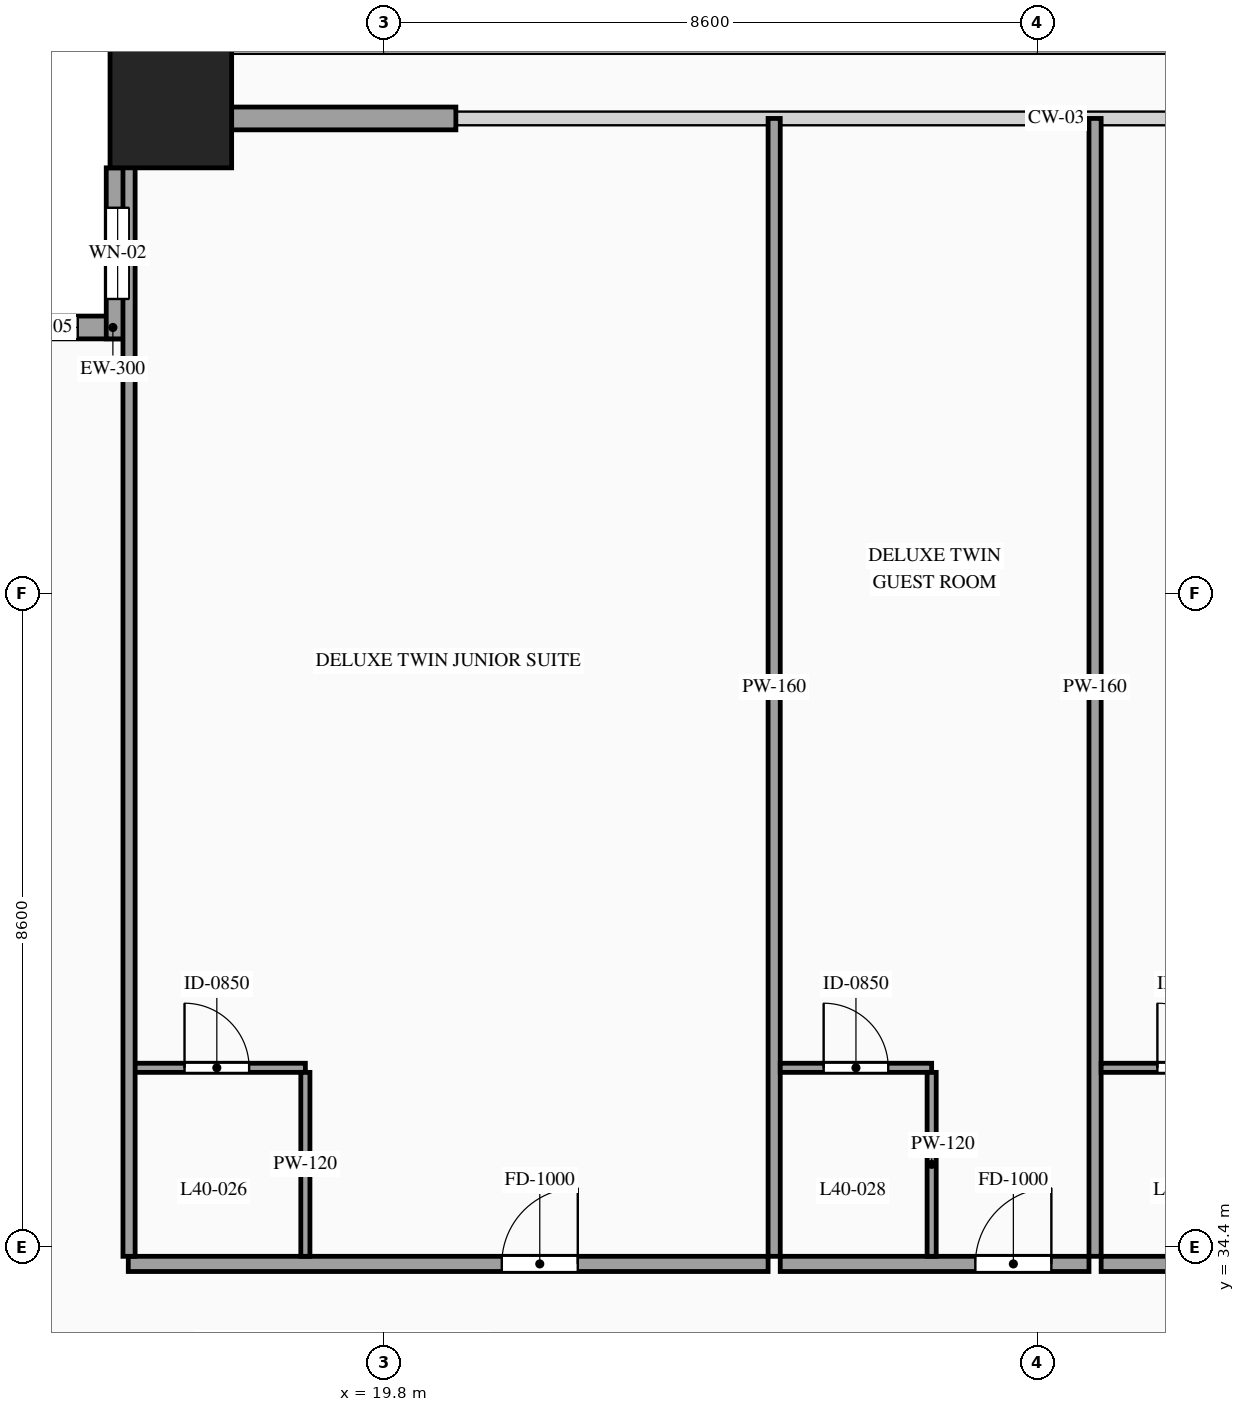
"""IFC4 building model, lengths in metres.
Left out: names, types, materials, properties, quantities, classifications, styles, units other than length and angle.
Written with IfcOpenShell. Run it as: python <this file> out.ifc"""

import sys

from ifc_helpers import new_model, si_unit, direction, frame, frame_2d, origin, origin_2d, place, context, subcontext, project, spatial, rectangle, hollow_rectangle, extrude, source, transform, mapped, element, fill, save


model = new_model("IFC4")
c1 = context("Model", 3, precision=1e-05, world=origin(), true_north=direction((0.0, 1.0)))
c2 = subcontext(c1, "Body", "Model", "MODEL_VIEW")
j1 = project(units=[si_unit("LENGTHUNIT", "METRE"), si_unit("PLANEANGLEUNIT", "RADIAN")], contexts=[c1])
p1 = place(None, origin())
s1 = spatial("IfcSite", under=j1, at=p1, CompositionType="ELEMENT")
p2 = place(p1, origin())
s2 = spatial("IfcBuilding", under=s1, at=p2, CompositionType="ELEMENT")
p3 = place(p2, frame((0.0, 0.0, 152.4)))
s3 = spatial("IfcBuildingStorey", under=s2, at=p3, CompositionType="ELEMENT", Elevation=152.4)
m1 = source(origin(), c2, "Body", "SweptSolid", [
    extrude(hollow_rectangle(XDim=1.6, YDim=1.6, WallThickness=0.07, at=origin_2d()), origin(), (0.0, 0.0, 1.0), 3.6),
])
p4 = place(p3, frame((17.0, 49.4, 0.0), z_axis=(0.0, 0.0, 1.0), x_axis=(1.0, 0.0, 0.0)))
e1 = element("IfcColumn", 1, at=p4, inside=s3, PredefinedType="COLUMN", context=c2, shape_type="MappedRepresentation", body=[
    mapped(m1, transform((0.0, 0.0, 0.0), scale=1.0)),
])
p5 = place(p3, frame((16.45, 46.5, 0.0), z_axis=(0.0, 0.0, 1.0), x_axis=(-1.0, 0.0, 0.0)))
e2 = element("IfcWall", 2, at=p5, inside=s3, PredefinedType="SOLIDWALL", context=c2, shape_type="SweptSolid", body=[
    extrude(rectangle(XDim=2.25, YDim=0.3, at=frame_2d((1.125, 0.0))), origin(), (0.0, 0.0, 1.0), 3.38),
])
p6 = place(p5, frame((0.675, 0.0, 0.85)))
e3 = element("IfcOpeningElement", 3, at=p6, cuts=e2, PredefinedType="OPENING", context=c2, shape_type="SweptSolid", body=[
    extrude(rectangle(XDim=0.9, YDim=1.5, at=frame_2d((0.45, 0.75))), frame((0.0, 0.165, 0.0), z_axis=(0.0, -1.0, 0.0), x_axis=(1.0, 0.0, 0.0)), (0.0, 0.0, 1.0), 0.33),
])
p7 = place(p3, frame((16.3, 48.6, 0.0), z_axis=(0.0, 0.0, 1.0), x_axis=(0.0, -1.0, 0.0)))
e4 = element("IfcWall", 4, at=p7, inside=s3, PredefinedType="SOLIDWALL", context=c2, shape_type="SweptSolid", body=[
    extrude(rectangle(XDim=2.25, YDim=0.3, at=frame_2d((1.125, 0.0))), origin(), (0.0, 0.0, 1.0), 3.38),
])
p8 = place(p7, frame((0.525, 0.0, 0.85)))
e5 = element("IfcOpeningElement", 5, at=p8, cuts=e4, PredefinedType="OPENING", context=c2, shape_type="SweptSolid", body=[
    extrude(rectangle(XDim=1.2, YDim=2.1, at=frame_2d((0.6, 1.05))), frame((0.0, 0.165, 0.0), z_axis=(0.0, -1.0, 0.0), x_axis=(1.0, 0.0, 0.0)), (0.0, 0.0, 1.0), 0.33),
])
m2 = source(origin(), c2, "Body", "SweptSolid", [
    extrude(rectangle(XDim=2.95, YDim=0.3, at=frame_2d((1.475, 0.0))), origin(), (0.0, 0.0, 1.0), 2.775),
])
p9 = place(p3, frame((17.8, 49.25, 0.0), z_axis=(0.0, 0.0, 1.0), x_axis=(1.0, 0.0, 0.0)))
e6 = element("IfcWall", 6, at=p9, inside=s3, PredefinedType="SOLIDWALL", context=c2, shape_type="MappedRepresentation", body=[
    mapped(m2, transform((0.0, 0.0, 0.0), scale=1.0)),
])
p10 = place(p3, frame((16.44, 34.18, 0.0), z_axis=(0.0, 0.0, 1.0), x_axis=(1.0, 0.0, 0.0)))
e7 = element("IfcWall", 7, at=p10, inside=s3, PredefinedType="PARTITIONING", context=c2, shape_type="SweptSolid", body=[
    extrude(rectangle(XDim=8.418, YDim=0.2, at=frame_2d((4.209, 0.0))), origin(), (0.0, 0.0, 1.0), 3.38),
])
p11 = place(p10, frame((4.914, 0.0, 0.0)))
e8 = element("IfcOpeningElement", 8, at=p11, cuts=e7, PredefinedType="OPENING", context=c2, shape_type="SweptSolid", body=[
    extrude(rectangle(XDim=1.0, YDim=2.2, at=frame_2d((0.5, 1.1))), frame((0.0, 0.115, 0.0), z_axis=(0.0, -1.0, 0.0), x_axis=(1.0, 0.0, 0.0)), (0.0, 0.0, 1.0), 0.23),
])
m3 = source(origin(), c2, "Body", "SweptSolid", [
    extrude(rectangle(XDim=14.97, YDim=0.16, at=frame_2d((7.485, 0.0))), origin(), (0.0, 0.0, 1.0), 3.38),
])
p12 = place(p3, frame((24.938, 34.28, 0.0), z_axis=(0.0, 0.0, 1.0), x_axis=(0.0, 1.0, 0.0)))
e9 = element("IfcWall", 9, at=p12, inside=s3, PredefinedType="PARTITIONING", context=c2, shape_type="MappedRepresentation", body=[
    mapped(m3, transform((0.0, 0.0, 0.0), scale=1.0)),
])
p13 = place(p3, frame((16.44, 36.76, 0.0), z_axis=(0.0, 0.0, 1.0), x_axis=(1.0, 0.0, 0.0)))
e10 = element("IfcWall", 10, at=p13, inside=s3, PredefinedType="PARTITIONING", context=c2, shape_type="SweptSolid", body=[
    extrude(rectangle(XDim=2.33, YDim=0.12, at=frame_2d((1.165, 0.0))), origin(), (0.0, 0.0, 1.0), 3.38),
])
p14 = place(p13, frame((0.74, 0.0, 0.0)))
e11 = element("IfcOpeningElement", 11, at=p14, cuts=e10, PredefinedType="OPENING", context=c2, shape_type="SweptSolid", body=[
    extrude(rectangle(XDim=0.85, YDim=2.1, at=frame_2d((0.425, 1.05))), frame((0.0, 0.075, 0.0), z_axis=(0.0, -1.0, 0.0), x_axis=(1.0, 0.0, 0.0)), (0.0, 0.0, 1.0), 0.15),
])
m4 = source(origin(), c2, "Body", "SweptSolid", [
    extrude(rectangle(XDim=2.42, YDim=0.12, at=frame_2d((1.21, 0.0))), origin(), (0.0, 0.0, 1.0), 3.38),
])
p15 = place(p3, frame((18.77, 34.28, 0.0), z_axis=(0.0, 0.0, 1.0), x_axis=(0.0, 1.0, 0.0)))
e12 = element("IfcWall", 12, at=p15, inside=s3, PredefinedType="PARTITIONING", context=c2, shape_type="MappedRepresentation", body=[
    mapped(m4, transform((0.0, 0.0, 0.0), scale=1.0)),
])
p16 = place(p3, frame((25.018, 34.18, 0.0), z_axis=(0.0, 0.0, 1.0), x_axis=(1.0, 0.0, 0.0)))
e13 = element("IfcWall", 13, at=p16, inside=s3, PredefinedType="PARTITIONING", context=c2, shape_type="SweptSolid", body=[
    extrude(rectangle(XDim=4.062, YDim=0.2, at=frame_2d((2.031, 0.0))), origin(), (0.0, 0.0, 1.0), 3.38),
])
p17 = place(p16, frame((2.567, 0.0, 0.0)))
e14 = element("IfcOpeningElement", 14, at=p17, cuts=e13, PredefinedType="OPENING", context=c2, shape_type="SweptSolid", body=[
    extrude(rectangle(XDim=1.0, YDim=2.2, at=frame_2d((0.5, 1.1))), frame((0.0, 0.115, 0.0), z_axis=(0.0, -1.0, 0.0), x_axis=(1.0, 0.0, 0.0)), (0.0, 0.0, 1.0), 0.23),
])
p18 = place(p3, frame((29.16, 34.28, 0.0), z_axis=(0.0, 0.0, 1.0), x_axis=(0.0, 1.0, 0.0)))
e15 = element("IfcWall", 15, at=p18, inside=s3, PredefinedType="PARTITIONING", context=c2, shape_type="MappedRepresentation", body=[
    mapped(m3, transform((0.0, 0.0, 0.0), scale=1.0)),
])
p19 = place(p3, frame((25.018, 36.76, 0.0), z_axis=(0.0, 0.0, 1.0), x_axis=(1.0, 0.0, 0.0)))
e16 = element("IfcWall", 16, at=p19, inside=s3, PredefinedType="PARTITIONING", context=c2, shape_type="SweptSolid", body=[
    extrude(rectangle(XDim=1.992, YDim=0.12, at=frame_2d((0.996, 0.0))), origin(), (0.0, 0.0, 1.0), 3.38),
])
p20 = place(p19, frame((0.571, 0.0, 0.0)))
e17 = element("IfcOpeningElement", 17, at=p20, cuts=e16, PredefinedType="OPENING", context=c2, shape_type="SweptSolid", body=[
    extrude(rectangle(XDim=0.85, YDim=2.1, at=frame_2d((0.425, 1.05))), frame((0.0, 0.075, 0.0), z_axis=(0.0, -1.0, 0.0), x_axis=(1.0, 0.0, 0.0)), (0.0, 0.0, 1.0), 0.15),
])
p21 = place(p3, frame((27.01, 34.28, 0.0), z_axis=(0.0, 0.0, 1.0), x_axis=(0.0, 1.0, 0.0)))
e18 = element("IfcWall", 18, at=p21, inside=s3, PredefinedType="PARTITIONING", context=c2, shape_type="MappedRepresentation", body=[
    mapped(m4, transform((0.0, 0.0, 0.0), scale=1.0)),
])
p22 = place(p3, frame((29.24, 34.18, 0.0), z_axis=(0.0, 0.0, 1.0), x_axis=(1.0, 0.0, 0.0)))
e19 = element("IfcWall", 19, at=p22, inside=s3, PredefinedType="PARTITIONING", context=c2, shape_type="SweptSolid", body=[
    extrude(rectangle(XDim=9.325, YDim=0.2, at=frame_2d((4.663, 0.0))), origin(), (0.0, 0.0, 1.0), 3.38),
])
p23 = place(p22, frame((5.368, 0.0, 0.0)))
e20 = element("IfcOpeningElement", 20, at=p23, cuts=e19, PredefinedType="OPENING", context=c2, shape_type="SweptSolid", body=[
    extrude(rectangle(XDim=1.0, YDim=2.2, at=frame_2d((0.5, 1.1))), frame((0.0, 0.115, 0.0), z_axis=(0.0, -1.0, 0.0), x_axis=(1.0, 0.0, 0.0)), (0.0, 0.0, 1.0), 0.23),
])
p24 = place(p3, frame((29.24, 36.76, 0.0), z_axis=(0.0, 0.0, 1.0), x_axis=(1.0, 0.0, 0.0)))
e21 = element("IfcWall", 21, at=p24, inside=s3, PredefinedType="PARTITIONING", context=c2, shape_type="SweptSolid", body=[
    extrude(rectangle(XDim=2.33, YDim=0.12, at=frame_2d((1.165, 0.0))), origin(), (0.0, 0.0, 1.0), 3.38),
])
p25 = place(p24, frame((0.74, 0.0, 0.0)))
e22 = element("IfcOpeningElement", 22, at=p25, cuts=e21, PredefinedType="OPENING", context=c2, shape_type="SweptSolid", body=[
    extrude(rectangle(XDim=0.85, YDim=2.1, at=frame_2d((0.425, 1.05))), frame((0.0, 0.075, 0.0), z_axis=(0.0, -1.0, 0.0), x_axis=(1.0, 0.0, 0.0)), (0.0, 0.0, 1.0), 0.15),
])
m5 = source(origin(), c2, "Body", "SweptSolid", [
    extrude(rectangle(XDim=14.82, YDim=0.16, at=frame_2d((7.41, 0.0))), origin(), (0.0, 0.0, 1.0), 3.38),
])
p26 = place(p3, frame((16.45, 34.28, 0.0), z_axis=(0.0, 0.0, 1.0), x_axis=(0.0, 1.0, 0.0)))
e23 = element("IfcWall", 23, at=p26, inside=s3, PredefinedType="PARTITIONING", context=c2, shape_type="MappedRepresentation", body=[
    mapped(m5, transform((0.0, 0.0, 0.0), scale=1.0)),
])
m6 = source(origin(), c2, "Body", "SweptSolid", [
    extrude(rectangle(XDim=0.9, YDim=1.5, at=frame_2d((0.45, 0.75))), frame((0.0, 0.03, 0.0), z_axis=(0.0, -1.0, 0.0), x_axis=(1.0, 0.0, 0.0)), (0.0, 0.0, 1.0), 0.06),
])
p27 = place(p6, origin())
e24 = element("IfcWindow", 24, at=p27, inside=s3, PartitioningType="SINGLE_PANEL", PredefinedType="WINDOW", context=c2, shape_type="MappedRepresentation", body=[
    mapped(m6, transform((0.0, 0.0, 0.0), scale=1.0)),
])
fill(e3, e24)
m7 = source(origin(), c2, "Body", "SweptSolid", [
    extrude(rectangle(XDim=1.2, YDim=2.1, at=frame_2d((0.6, 1.05))), frame((0.0, 0.03, 0.0), z_axis=(0.0, -1.0, 0.0), x_axis=(1.0, 0.0, 0.0)), (0.0, 0.0, 1.0), 0.06),
])
p28 = place(p8, origin())
e25 = element("IfcWindow", 25, at=p28, inside=s3, PartitioningType="SINGLE_PANEL", PredefinedType="WINDOW", context=c2, shape_type="MappedRepresentation", body=[
    mapped(m7, transform((0.0, 0.0, 0.0), scale=1.0)),
])
fill(e5, e25)
m8 = source(origin(), c2, "Body", "SweptSolid", [
    extrude(rectangle(XDim=1.0, YDim=2.2, at=frame_2d((0.5, 1.1))), frame((0.0, 0.025, 0.0), z_axis=(0.0, -1.0, 0.0), x_axis=(1.0, 0.0, 0.0)), (0.0, 0.0, 1.0), 0.05),
])
p29 = place(p11, origin())
e26 = element("IfcDoor", 26, at=p29, inside=s3, OperationType="SINGLE_SWING_RIGHT", PredefinedType="DOOR", context=c2, shape_type="MappedRepresentation", body=[
    mapped(m8, transform((0.0, 0.0, 0.0), scale=1.0)),
])
fill(e8, e26)
m9 = source(origin(), c2, "Body", "SweptSolid", [
    extrude(rectangle(XDim=0.85, YDim=2.1, at=frame_2d((0.425, 1.05))), frame((0.0, 0.025, 0.0), z_axis=(0.0, -1.0, 0.0), x_axis=(1.0, 0.0, 0.0)), (0.0, 0.0, 1.0), 0.05),
])
p30 = place(p14, origin())
e27 = element("IfcDoor", 27, at=p30, inside=s3, OperationType="SINGLE_SWING_LEFT", PredefinedType="DOOR", context=c2, shape_type="MappedRepresentation", body=[
    mapped(m9, transform((0.0, 0.0, 0.0), scale=1.0)),
])
fill(e11, e27)
p31 = place(p17, origin())
e28 = element("IfcDoor", 28, at=p31, inside=s3, OperationType="SINGLE_SWING_RIGHT", PredefinedType="DOOR", context=c2, shape_type="MappedRepresentation", body=[
    mapped(m8, transform((0.0, 0.0, 0.0), scale=1.0)),
])
fill(e14, e28)
p32 = place(p20, origin())
e29 = element("IfcDoor", 29, at=p32, inside=s3, OperationType="SINGLE_SWING_LEFT", PredefinedType="DOOR", context=c2, shape_type="MappedRepresentation", body=[
    mapped(m9, transform((0.0, 0.0, 0.0), scale=1.0)),
])
fill(e17, e29)
p33 = place(p25, origin())
e30 = element("IfcDoor", 30, at=p33, inside=s3, OperationType="SINGLE_SWING_LEFT", PredefinedType="DOOR", context=c2, shape_type="MappedRepresentation", body=[
    mapped(m9, transform((0.0, 0.0, 0.0), scale=1.0)),
])
fill(e22, e30)
save(model, sys.argv[1])
